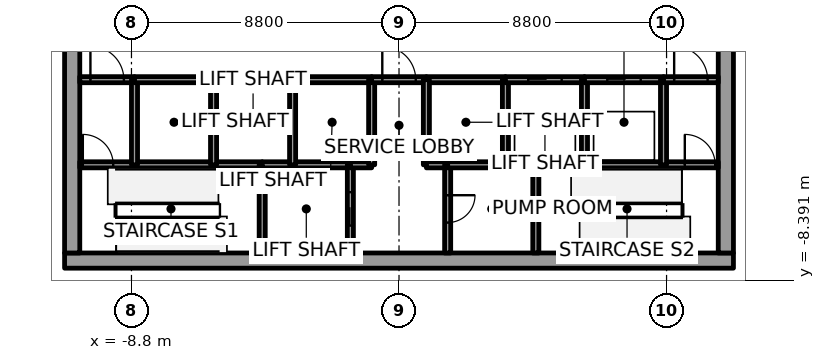
"""IFC4 building model, lengths in metres.
Left out: names, types, materials, properties, quantities, classifications, styles, units other than length and angle.
Written with IfcOpenShell. Run it as: python <this file> out.ifc"""

import sys

from ifc_helpers import new_model, si_unit, direction, frame, frame_2d, origin, place, context, subcontext, project, spatial, rectangle, extrude, element, fill, save


model = new_model("IFC4")
c1 = context("Model", 3, precision=1e-05, world=origin(), true_north=direction((0.0, 1.0)))
c2 = subcontext(c1, "Body", "Model", "MODEL_VIEW")
j1 = project(units=[si_unit("LENGTHUNIT", "METRE"), si_unit("PLANEANGLEUNIT", "RADIAN")], contexts=[c1])
p1 = place(None, origin())
s1 = spatial("IfcSite", under=j1, at=p1, CompositionType="ELEMENT")
p2 = place(p1, origin())
s2 = spatial("IfcBuilding", under=s1, at=p2, CompositionType="ELEMENT")
p3 = place(p2, frame((0.0, 0.0, -4.5)))
s3 = spatial("IfcBuildingStorey", under=s2, at=p3, CompositionType="ELEMENT", Elevation=-4.5)
p4 = place(p3, frame((-11.0, -7.75, 0.0), z_axis=(0.0, 0.0, 1.0), x_axis=(1.0, 0.0, 0.0)))
e1 = element("IfcWall", 1, at=p4, inside=s3, PredefinedType="SHEAR", context=c2, shape_type="SweptSolid", body=[
    extrude(rectangle(XDim=22.0, YDim=0.5, at=frame_2d((11.0, 0.0))), origin(), (0.0, 0.0, 1.0), 4.5),
])
for number, where, z_axis, x_axis in (
    (2, (-10.75, -7.5, 0.0), (0.0, 0.0, 1.0), (0.0, 1.0, 0.0)),
    (3, (10.75, -7.5, 0.0), (0.0, 0.0, 1.0), (0.0, 1.0, 0.0)),
):
    element("IfcWall", number, at=place(p3, frame(where, z_axis=z_axis, x_axis=x_axis)), inside=s3, PredefinedType="SHEAR", context=c2, shape_type="SweptSolid", body=[
        extrude(rectangle(XDim=15.0, YDim=0.5, at=frame_2d((7.5, 0.0))), origin(), (0.0, 0.0, 1.0), 4.5),
    ])
p5 = place(p3, frame((-10.5, -4.6, 0.0), z_axis=(0.0, 0.0, 1.0), x_axis=(1.0, 0.0, 0.0)))
e4 = element("IfcWall", 4, at=p5, inside=s3, PredefinedType="SOLIDWALL", context=c2, shape_type="SweptSolid", body=[
    extrude(rectangle(XDim=1.8, YDim=0.2, at=frame_2d((0.9, 0.0))), origin(), (0.0, 0.0, 1.0), 4.25),
])
p6 = place(p5, frame((0.1, 0.0, 0.0)))
e5 = element("IfcOpeningElement", 5, at=p6, cuts=e4, PredefinedType="OPENING", context=c2, shape_type="SweptSolid", body=[
    extrude(rectangle(XDim=1.0, YDim=2.1, at=frame_2d((0.5, 1.05))), frame((0.0, 0.1, 0.0), z_axis=(0.0, -1.0, 0.0), x_axis=(1.0, 0.0, 0.0)), (0.0, 0.0, 1.0), 0.2),
])
p7 = place(p3, frame((-10.5, -1.8, 0.0), z_axis=(0.0, 0.0, 1.0), x_axis=(1.0, 0.0, 0.0)))
e6 = element("IfcWall", 6, at=p7, inside=s3, PredefinedType="SOLIDWALL", context=c2, shape_type="SweptSolid", body=[
    extrude(rectangle(XDim=1.8, YDim=0.2, at=frame_2d((0.9, 0.0))), origin(), (0.0, 0.0, 1.0), 4.25),
])
p8 = place(p7, frame((0.35, 0.0, 0.0)))
e7 = element("IfcOpeningElement", 7, at=p8, cuts=e6, PredefinedType="OPENING", context=c2, shape_type="SweptSolid", body=[
    extrude(rectangle(XDim=1.1, YDim=2.4, at=frame_2d((0.55, 1.2))), frame((0.0, 0.1, 0.0), z_axis=(0.0, -1.0, 0.0), x_axis=(1.0, 0.0, 0.0)), (0.0, 0.0, 1.0), 0.2),
])
p9 = place(p3, frame((-8.7, -4.6, 0.0), z_axis=(0.0, 0.0, 1.0), x_axis=(1.0, 0.0, 0.0)))
e8 = element("IfcWall", 8, at=p9, inside=s3, PredefinedType="SOLIDWALL", context=c2, shape_type="SweptSolid", body=[
    extrude(rectangle(XDim=2.6, YDim=0.2, at=frame_2d((1.3, 0.0))), origin(), (0.0, 0.0, 1.0), 4.25),
])
p10 = place(p3, frame((-8.7, -4.6, 0.0), z_axis=(0.0, 0.0, 1.0), x_axis=(0.0, 1.0, 0.0)))
e9 = element("IfcWall", 9, at=p10, inside=s3, PredefinedType="SOLIDWALL", context=c2, shape_type="SweptSolid", body=[
    extrude(rectangle(XDim=2.8, YDim=0.2, at=frame_2d((1.4, 0.0))), origin(), (0.0, 0.0, 1.0), 4.25),
])
p11 = place(p3, frame((-8.7, -1.8, 0.0), z_axis=(0.0, 0.0, 1.0), x_axis=(1.0, 0.0, 0.0)))
e10 = element("IfcWall", 10, at=p11, inside=s3, PredefinedType="SOLIDWALL", context=c2, shape_type="SweptSolid", body=[
    extrude(rectangle(XDim=2.6, YDim=0.2, at=frame_2d((1.3, 0.0))), origin(), (0.0, 0.0, 1.0), 4.25),
])
p12 = place(p3, frame((-6.1, -4.6, 0.0), z_axis=(0.0, 0.0, 1.0), x_axis=(1.0, 0.0, 0.0)))
e11 = element("IfcWall", 11, at=p12, inside=s3, PredefinedType="SOLIDWALL", context=c2, shape_type="SweptSolid", body=[
    extrude(rectangle(XDim=1.6, YDim=0.2, at=frame_2d((0.8, 0.0))), origin(), (0.0, 0.0, 1.0), 4.25),
])
p13 = place(p3, frame((-6.1, -4.6, 0.0), z_axis=(0.0, 0.0, 1.0), x_axis=(0.0, 1.0, 0.0)))
e12 = element("IfcWall", 12, at=p13, inside=s3, PredefinedType="SOLIDWALL", context=c2, shape_type="SweptSolid", body=[
    extrude(rectangle(XDim=2.8, YDim=0.2, at=frame_2d((1.4, 0.0))), origin(), (0.0, 0.0, 1.0), 4.25),
])
p14 = place(p3, frame((-6.1, -1.8, 0.0), z_axis=(0.0, 0.0, 1.0), x_axis=(1.0, 0.0, 0.0)))
e13 = element("IfcWall", 13, at=p14, inside=s3, PredefinedType="SOLIDWALL", context=c2, shape_type="SweptSolid", body=[
    extrude(rectangle(XDim=2.6, YDim=0.2, at=frame_2d((1.3, 0.0))), origin(), (0.0, 0.0, 1.0), 4.25),
])
p15 = place(p3, frame((-4.5, -4.6, 0.0), z_axis=(0.0, 0.0, 1.0), x_axis=(0.0, -1.0, 0.0)))
e14 = element("IfcWall", 14, at=p15, inside=s3, PredefinedType="SOLIDWALL", context=c2, shape_type="SweptSolid", body=[
    extrude(rectangle(XDim=2.9, YDim=0.2, at=frame_2d((1.45, 0.0))), origin(), (0.0, 0.0, 1.0), 4.25),
])
p16 = place(p3, frame((-4.5, -4.6, 0.0), z_axis=(0.0, 0.0, 1.0), x_axis=(1.0, 0.0, 0.0)))
e15 = element("IfcWall", 15, at=p16, inside=s3, PredefinedType="SOLIDWALL", context=c2, shape_type="SweptSolid", body=[
    extrude(rectangle(XDim=1.0, YDim=0.2, at=frame_2d((0.5, 0.0))), origin(), (0.0, 0.0, 1.0), 4.25),
])
p17 = place(p3, frame((-3.5, -4.6, 0.0), z_axis=(0.0, 0.0, 1.0), x_axis=(1.0, 0.0, 0.0)))
e16 = element("IfcWall", 16, at=p17, inside=s3, PredefinedType="SOLIDWALL", context=c2, shape_type="SweptSolid", body=[
    extrude(rectangle(XDim=1.9, YDim=0.2, at=frame_2d((0.95, 0.0))), origin(), (0.0, 0.0, 1.0), 4.25),
])
p18 = place(p3, frame((-3.5, -4.6, 0.0), z_axis=(0.0, 0.0, 1.0), x_axis=(0.0, 1.0, 0.0)))
e17 = element("IfcWall", 17, at=p18, inside=s3, PredefinedType="SOLIDWALL", context=c2, shape_type="SweptSolid", body=[
    extrude(rectangle(XDim=2.8, YDim=0.2, at=frame_2d((1.4, 0.0))), origin(), (0.0, 0.0, 1.0), 4.25),
])
p19 = place(p3, frame((-3.5, -1.8, 0.0), z_axis=(0.0, 0.0, 1.0), x_axis=(1.0, 0.0, 0.0)))
e18 = element("IfcWall", 18, at=p19, inside=s3, PredefinedType="SOLIDWALL", context=c2, shape_type="SweptSolid", body=[
    extrude(rectangle(XDim=2.6, YDim=0.2, at=frame_2d((1.3, 0.0))), origin(), (0.0, 0.0, 1.0), 4.25),
])
p20 = place(p3, frame((-1.6, -7.5, 0.0), z_axis=(0.0, 0.0, 1.0), x_axis=(0.0, 1.0, 0.0)))
e19 = element("IfcWall", 19, at=p20, inside=s3, PredefinedType="SOLIDWALL", context=c2, shape_type="SweptSolid", body=[
    extrude(rectangle(XDim=2.9, YDim=0.2, at=frame_2d((1.45, 0.0))), origin(), (0.0, 0.0, 1.0), 4.25),
])
p21 = place(p20, frame((0.9, 0.0, 0.0)))
e20 = element("IfcOpeningElement", 20, at=p21, cuts=e19, PredefinedType="OPENING", context=c2, shape_type="SweptSolid", body=[
    extrude(rectangle(XDim=1.1, YDim=2.1, at=frame_2d((0.55, 1.05))), frame((0.0, 0.1, 0.0), z_axis=(0.0, -1.0, 0.0), x_axis=(1.0, 0.0, 0.0)), (0.0, 0.0, 1.0), 0.2),
])
p22 = place(p3, frame((-1.6, -4.6, 0.0), z_axis=(0.0, 0.0, 1.0), x_axis=(1.0, 0.0, 0.0)))
e21 = element("IfcWall", 21, at=p22, inside=s3, PredefinedType="SOLIDWALL", context=c2, shape_type="SweptSolid", body=[
    extrude(rectangle(XDim=0.7, YDim=0.2, at=frame_2d((0.35, 0.0))), origin(), (0.0, 0.0, 1.0), 4.25),
])
p23 = place(p3, frame((-0.9, -4.6, 0.0), z_axis=(0.0, 0.0, 1.0), x_axis=(0.0, 1.0, 0.0)))
e22 = element("IfcWall", 22, at=p23, inside=s3, PredefinedType="SOLIDWALL", context=c2, shape_type="SweptSolid", body=[
    extrude(rectangle(XDim=2.8, YDim=0.2, at=frame_2d((1.4, 0.0))), origin(), (0.0, 0.0, 1.0), 4.25),
])
p24 = place(p3, frame((-0.9, -1.8, 0.0), z_axis=(0.0, 0.0, 1.0), x_axis=(1.0, 0.0, 0.0)))
e23 = element("IfcWall", 23, at=p24, inside=s3, PredefinedType="SOLIDWALL", context=c2, shape_type="SweptSolid", body=[
    extrude(rectangle(XDim=1.8, YDim=0.2, at=frame_2d((0.9, 0.0))), origin(), (0.0, 0.0, 1.0), 4.25),
])
p25 = place(p24, frame((0.35, 0.0, 0.0)))
e24 = element("IfcOpeningElement", 24, at=p25, cuts=e23, PredefinedType="OPENING", context=c2, shape_type="SweptSolid", body=[
    extrude(rectangle(XDim=1.1, YDim=2.4, at=frame_2d((0.55, 1.2))), frame((0.0, 0.1, 0.0), z_axis=(0.0, -1.0, 0.0), x_axis=(1.0, 0.0, 0.0)), (0.0, 0.0, 1.0), 0.2),
])
p26 = place(p3, frame((0.9, -1.8, 0.0), z_axis=(0.0, 0.0, 1.0), x_axis=(1.0, 0.0, 0.0)))
e25 = element("IfcWall", 25, at=p26, inside=s3, PredefinedType="SOLIDWALL", context=c2, shape_type="SweptSolid", body=[
    extrude(rectangle(XDim=2.6, YDim=0.2, at=frame_2d((1.3, 0.0))), origin(), (0.0, 0.0, 1.0), 4.25),
])
p27 = place(p3, frame((0.9, -1.8, 0.0), z_axis=(0.0, 0.0, 1.0), x_axis=(0.0, -1.0, 0.0)))
e26 = element("IfcWall", 26, at=p27, inside=s3, PredefinedType="SOLIDWALL", context=c2, shape_type="SweptSolid", body=[
    extrude(rectangle(XDim=2.8, YDim=0.2, at=frame_2d((1.4, 0.0))), origin(), (0.0, 0.0, 1.0), 4.25),
])
p28 = place(p3, frame((0.9, -4.6, 0.0), z_axis=(0.0, 0.0, 1.0), x_axis=(1.0, 0.0, 0.0)))
e27 = element("IfcWall", 27, at=p28, inside=s3, PredefinedType="SOLIDWALL", context=c2, shape_type="SweptSolid", body=[
    extrude(rectangle(XDim=0.7, YDim=0.2, at=frame_2d((0.35, 0.0))), origin(), (0.0, 0.0, 1.0), 4.25),
])
p29 = place(p3, frame((1.6, -4.6, 0.0), z_axis=(0.0, 0.0, 1.0), x_axis=(0.0, -1.0, 0.0)))
e28 = element("IfcWall", 28, at=p29, inside=s3, PredefinedType="SOLIDWALL", context=c2, shape_type="SweptSolid", body=[
    extrude(rectangle(XDim=2.9, YDim=0.2, at=frame_2d((1.45, 0.0))), origin(), (0.0, 0.0, 1.0), 4.25),
])
p30 = place(p29, frame((1.0, 0.0, 0.0)))
e29 = element("IfcOpeningElement", 29, at=p30, cuts=e28, PredefinedType="OPENING", context=c2, shape_type="SweptSolid", body=[
    extrude(rectangle(XDim=0.9, YDim=2.4, at=frame_2d((0.45, 1.2))), frame((0.0, 0.1, 0.0), z_axis=(0.0, -1.0, 0.0), x_axis=(1.0, 0.0, 0.0)), (0.0, 0.0, 1.0), 0.2),
])
p31 = place(p3, frame((3.5, -4.6, 0.0), z_axis=(0.0, 0.0, 1.0), x_axis=(-1.0, 0.0, 0.0)))
e30 = element("IfcWall", 30, at=p31, inside=s3, PredefinedType="SOLIDWALL", context=c2, shape_type="SweptSolid", body=[
    extrude(rectangle(XDim=1.9, YDim=0.2, at=frame_2d((0.95, 0.0))), origin(), (0.0, 0.0, 1.0), 4.25),
])
p32 = place(p3, frame((4.5, -4.6, 0.0), z_axis=(0.0, 0.0, 1.0), x_axis=(-1.0, 0.0, 0.0)))
e31 = element("IfcWall", 31, at=p32, inside=s3, PredefinedType="SOLIDWALL", context=c2, shape_type="SweptSolid", body=[
    extrude(rectangle(XDim=1.0, YDim=0.2, at=frame_2d((0.5, 0.0))), origin(), (0.0, 0.0, 1.0), 4.25),
])
p33 = place(p3, frame((3.5, -4.6, 0.0), z_axis=(0.0, 0.0, 1.0), x_axis=(0.0, 1.0, 0.0)))
e32 = element("IfcWall", 32, at=p33, inside=s3, PredefinedType="SOLIDWALL", context=c2, shape_type="SweptSolid", body=[
    extrude(rectangle(XDim=2.8, YDim=0.2, at=frame_2d((1.4, 0.0))), origin(), (0.0, 0.0, 1.0), 4.25),
])
p34 = place(p3, frame((3.5, -1.8, 0.0), z_axis=(0.0, 0.0, 1.0), x_axis=(1.0, 0.0, 0.0)))
e33 = element("IfcWall", 33, at=p34, inside=s3, PredefinedType="SOLIDWALL", context=c2, shape_type="SweptSolid", body=[
    extrude(rectangle(XDim=2.6, YDim=0.2, at=frame_2d((1.3, 0.0))), origin(), (0.0, 0.0, 1.0), 4.25),
])
p35 = place(p34, frame((0.75, 0.0, 0.0)))
e34 = element("IfcOpeningElement", 34, at=p35, cuts=e33, PredefinedType="OPENING", context=c2, shape_type="SweptSolid", body=[
    extrude(rectangle(XDim=1.1, YDim=2.1, at=frame_2d((0.55, 1.05))), frame((0.0, 0.1, 0.0), z_axis=(0.0, -1.0, 0.0), x_axis=(1.0, 0.0, 0.0)), (0.0, 0.0, 1.0), 0.2),
])
p36 = place(p3, frame((4.5, -7.5, 0.0), z_axis=(0.0, 0.0, 1.0), x_axis=(0.0, 1.0, 0.0)))
e35 = element("IfcWall", 35, at=p36, inside=s3, PredefinedType="SOLIDWALL", context=c2, shape_type="SweptSolid", body=[
    extrude(rectangle(XDim=2.9, YDim=0.2, at=frame_2d((1.45, 0.0))), origin(), (0.0, 0.0, 1.0), 4.25),
])
p37 = place(p3, frame((4.5, -4.6, 0.0), z_axis=(0.0, 0.0, 1.0), x_axis=(1.0, 0.0, 0.0)))
e36 = element("IfcWall", 36, at=p37, inside=s3, PredefinedType="SOLIDWALL", context=c2, shape_type="SweptSolid", body=[
    extrude(rectangle(XDim=1.6, YDim=0.2, at=frame_2d((0.8, 0.0))), origin(), (0.0, 0.0, 1.0), 4.25),
])
p38 = place(p3, frame((6.1, -4.6, 0.0), z_axis=(0.0, 0.0, 1.0), x_axis=(1.0, 0.0, 0.0)))
e37 = element("IfcWall", 37, at=p38, inside=s3, PredefinedType="SOLIDWALL", context=c2, shape_type="SweptSolid", body=[
    extrude(rectangle(XDim=2.6, YDim=0.2, at=frame_2d((1.3, 0.0))), origin(), (0.0, 0.0, 1.0), 4.25),
])
p39 = place(p3, frame((6.1, -4.6, 0.0), z_axis=(0.0, 0.0, 1.0), x_axis=(0.0, 1.0, 0.0)))
e38 = element("IfcWall", 38, at=p39, inside=s3, PredefinedType="SOLIDWALL", context=c2, shape_type="SweptSolid", body=[
    extrude(rectangle(XDim=2.8, YDim=0.2, at=frame_2d((1.4, 0.0))), origin(), (0.0, 0.0, 1.0), 4.25),
])
p40 = place(p3, frame((6.1, -1.8, 0.0), z_axis=(0.0, 0.0, 1.0), x_axis=(1.0, 0.0, 0.0)))
e39 = element("IfcWall", 39, at=p40, inside=s3, PredefinedType="SOLIDWALL", context=c2, shape_type="SweptSolid", body=[
    extrude(rectangle(XDim=2.6, YDim=0.2, at=frame_2d((1.3, 0.0))), origin(), (0.0, 0.0, 1.0), 4.25),
])
p41 = place(p40, frame((0.75, 0.0, 0.0)))
e40 = element("IfcOpeningElement", 40, at=p41, cuts=e39, PredefinedType="OPENING", context=c2, shape_type="SweptSolid", body=[
    extrude(rectangle(XDim=1.1, YDim=2.1, at=frame_2d((0.55, 1.05))), frame((0.0, 0.1, 0.0), z_axis=(0.0, -1.0, 0.0), x_axis=(1.0, 0.0, 0.0)), (0.0, 0.0, 1.0), 0.2),
])
p42 = place(p3, frame((8.7, -4.6, 0.0), z_axis=(0.0, 0.0, 1.0), x_axis=(1.0, 0.0, 0.0)))
e41 = element("IfcWall", 41, at=p42, inside=s3, PredefinedType="SOLIDWALL", context=c2, shape_type="SweptSolid", body=[
    extrude(rectangle(XDim=1.8, YDim=0.2, at=frame_2d((0.9, 0.0))), origin(), (0.0, 0.0, 1.0), 4.25),
])
p43 = place(p42, frame((0.7, 0.0, 0.0)))
e42 = element("IfcOpeningElement", 42, at=p43, cuts=e41, PredefinedType="OPENING", context=c2, shape_type="SweptSolid", body=[
    extrude(rectangle(XDim=1.0, YDim=2.1, at=frame_2d((0.5, 1.05))), frame((0.0, 0.1, 0.0), z_axis=(0.0, -1.0, 0.0), x_axis=(1.0, 0.0, 0.0)), (0.0, 0.0, 1.0), 0.2),
])
p44 = place(p3, frame((8.7, -1.8, 0.0), z_axis=(0.0, 0.0, 1.0), x_axis=(0.0, -1.0, 0.0)))
e43 = element("IfcWall", 43, at=p44, inside=s3, PredefinedType="SOLIDWALL", context=c2, shape_type="SweptSolid", body=[
    extrude(rectangle(XDim=2.8, YDim=0.2, at=frame_2d((1.4, 0.0))), origin(), (0.0, 0.0, 1.0), 4.25),
])
p45 = place(p3, frame((8.7, -1.8, 0.0), z_axis=(0.0, 0.0, 1.0), x_axis=(1.0, 0.0, 0.0)))
e44 = element("IfcWall", 44, at=p45, inside=s3, PredefinedType="SOLIDWALL", context=c2, shape_type="SweptSolid", body=[
    extrude(rectangle(XDim=1.8, YDim=0.2, at=frame_2d((0.9, 0.0))), origin(), (0.0, 0.0, 1.0), 4.25),
])
p46 = place(p45, frame((0.35, 0.0, 0.0)))
e45 = element("IfcOpeningElement", 45, at=p46, cuts=e44, PredefinedType="OPENING", context=c2, shape_type="SweptSolid", body=[
    extrude(rectangle(XDim=1.1, YDim=2.4, at=frame_2d((0.55, 1.2))), frame((0.0, 0.1, 0.0), z_axis=(0.0, -1.0, 0.0), x_axis=(1.0, 0.0, 0.0)), (0.0, 0.0, 1.0), 0.2),
])
p47 = place(p35, origin())
e46 = element("IfcDoor", 46, at=p47, inside=s3, OperationType="SLIDING_TO_RIGHT", PredefinedType="DOOR", context=c2, shape_type="SweptSolid", body=[
    extrude(rectangle(XDim=1.1, YDim=2.1, at=frame_2d((0.55, 1.05))), frame((0.0, 0.025, 0.0), z_axis=(0.0, -1.0, 0.0), x_axis=(1.0, 0.0, 0.0)), (0.0, 0.0, 1.0), 0.05),
])
fill(e34, e46)
p48 = place(p41, origin())
e47 = element("IfcDoor", 47, at=p48, inside=s3, OperationType="SLIDING_TO_RIGHT", PredefinedType="DOOR", context=c2, shape_type="SweptSolid", body=[
    extrude(rectangle(XDim=1.1, YDim=2.1, at=frame_2d((0.55, 1.05))), frame((0.0, 0.025, 0.0), z_axis=(0.0, -1.0, 0.0), x_axis=(1.0, 0.0, 0.0)), (0.0, 0.0, 1.0), 0.05),
])
fill(e40, e47)
p49 = place(p21, origin())
e48 = element("IfcDoor", 48, at=p49, inside=s3, OperationType="SLIDING_TO_RIGHT", PredefinedType="DOOR", context=c2, shape_type="SweptSolid", body=[
    extrude(rectangle(XDim=1.1, YDim=2.1, at=frame_2d((0.55, 1.05))), frame((0.0, 0.025, 0.0), z_axis=(0.0, -1.0, 0.0), x_axis=(1.0, 0.0, 0.0)), (0.0, 0.0, 1.0), 0.05),
])
fill(e20, e48)
p50 = place(p8, origin())
e49 = element("IfcDoor", 49, at=p50, inside=s3, OperationType="SINGLE_SWING_LEFT", PredefinedType="DOOR", context=c2, shape_type="SweptSolid", body=[
    extrude(rectangle(XDim=1.1, YDim=2.4, at=frame_2d((0.55, 1.2))), frame((0.0, 0.025, 0.0), z_axis=(0.0, -1.0, 0.0), x_axis=(1.0, 0.0, 0.0)), (0.0, 0.0, 1.0), 0.05),
])
fill(e7, e49)
p51 = place(p46, origin())
e50 = element("IfcDoor", 50, at=p51, inside=s3, OperationType="SINGLE_SWING_RIGHT", PredefinedType="DOOR", context=c2, shape_type="SweptSolid", body=[
    extrude(rectangle(XDim=1.1, YDim=2.4, at=frame_2d((0.55, 1.2))), frame((0.0, 0.025, 0.0), z_axis=(0.0, -1.0, 0.0), x_axis=(1.0, 0.0, 0.0)), (0.0, 0.0, 1.0), 0.05),
])
fill(e45, e50)
p52 = place(p25, origin())
e51 = element("IfcDoor", 51, at=p52, inside=s3, OperationType="SINGLE_SWING_RIGHT", PredefinedType="DOOR", context=c2, shape_type="SweptSolid", body=[
    extrude(rectangle(XDim=1.1, YDim=2.4, at=frame_2d((0.55, 1.2))), frame((0.0, 0.025, 0.0), z_axis=(0.0, -1.0, 0.0), x_axis=(1.0, 0.0, 0.0)), (0.0, 0.0, 1.0), 0.05),
])
fill(e24, e51)
p53 = place(p6, origin())
e52 = element("IfcDoor", 52, at=p53, inside=s3, OperationType="SINGLE_SWING_LEFT", PredefinedType="DOOR", context=c2, shape_type="SweptSolid", body=[
    extrude(rectangle(XDim=1.0, YDim=2.1, at=frame_2d((0.5, 1.05))), frame((0.0, 0.025, 0.0), z_axis=(0.0, -1.0, 0.0), x_axis=(1.0, 0.0, 0.0)), (0.0, 0.0, 1.0), 0.05),
])
fill(e5, e52)
p54 = place(p43, origin())
e53 = element("IfcDoor", 53, at=p54, inside=s3, OperationType="SINGLE_SWING_RIGHT", PredefinedType="DOOR", context=c2, shape_type="SweptSolid", body=[
    extrude(rectangle(XDim=1.0, YDim=2.1, at=frame_2d((0.5, 1.05))), frame((0.0, 0.025, 0.0), z_axis=(0.0, -1.0, 0.0), x_axis=(1.0, 0.0, 0.0)), (0.0, 0.0, 1.0), 0.05),
])
fill(e42, e53)
p55 = place(p30, origin())
e54 = element("IfcDoor", 54, at=p55, inside=s3, OperationType="SINGLE_SWING_RIGHT", PredefinedType="DOOR", context=c2, shape_type="SweptSolid", body=[
    extrude(rectangle(XDim=0.9, YDim=2.4, at=frame_2d((0.45, 1.2))), frame((0.0, 0.025, 0.0), z_axis=(0.0, -1.0, 0.0), x_axis=(1.0, 0.0, 0.0)), (0.0, 0.0, 1.0), 0.05),
])
fill(e29, e54)
save(model, sys.argv[1])
